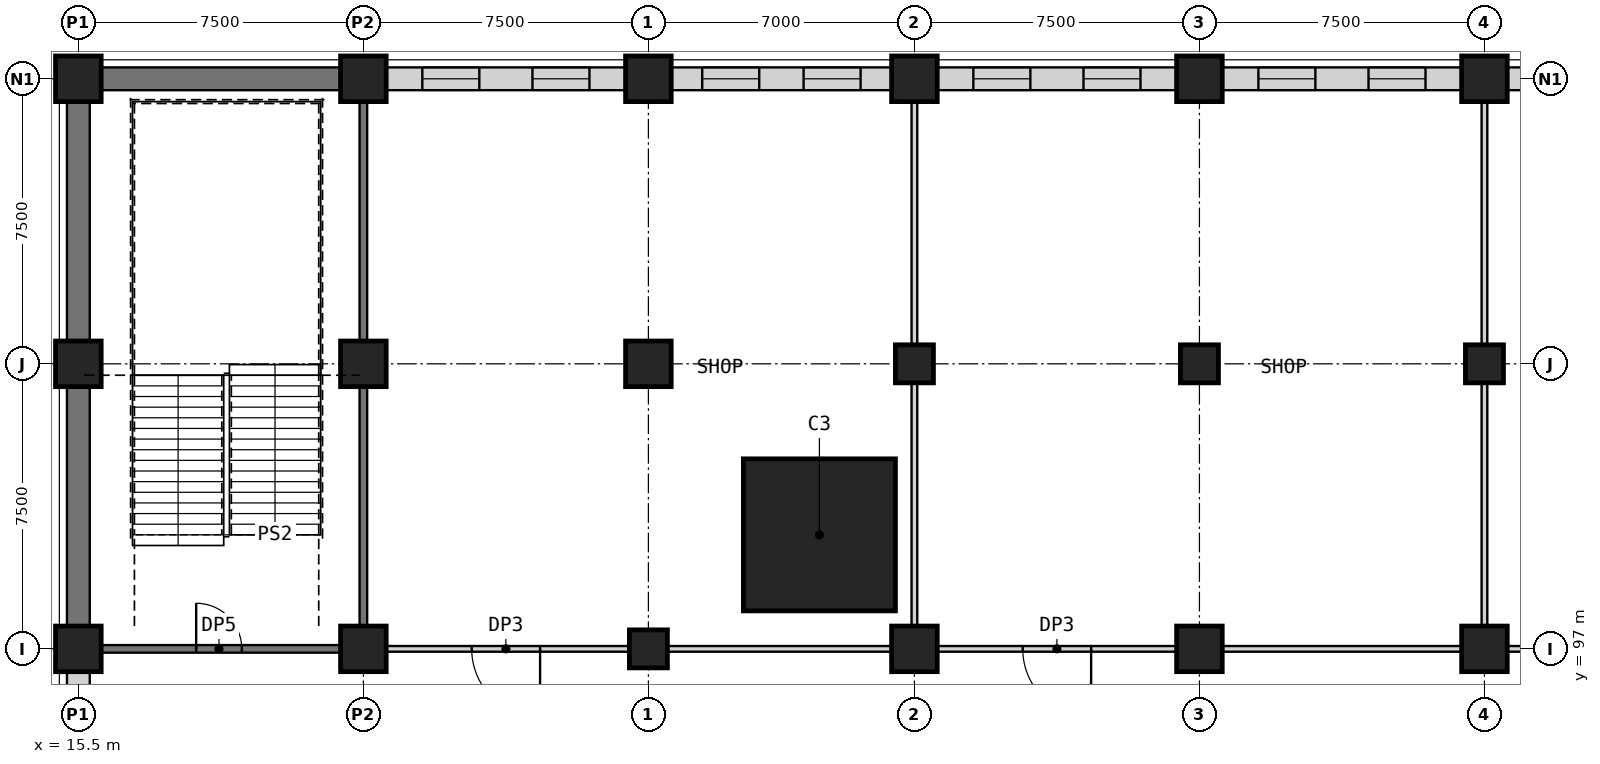
"""IFC4 building model, lengths in metres.
Left out: names, types, materials, properties, quantities, classifications, styles, units other than length and angle.
Written with IfcOpenShell. Run it as: python <this file> out.ifc"""

import sys

from ifc_helpers import new_model, si_unit, direction, frame, frame_2d, origin, origin_2d, place, context, subcontext, project, spatial, rectangle, extrude, element, fill, save


model = new_model("IFC4")
c1 = context("Model", 3, precision=1e-05, world=origin(), true_north=direction((0.0, 1.0)))
c2 = subcontext(c1, "Body", "Model", "MODEL_VIEW")
j1 = project(units=[si_unit("LENGTHUNIT", "METRE"), si_unit("PLANEANGLEUNIT", "RADIAN")], contexts=[c1])
p1 = place(None, origin())
s1 = spatial("IfcSite", under=j1, at=p1, CompositionType="ELEMENT")
p2 = place(p1, origin())
s2 = spatial("IfcBuilding", under=s1, at=p2, CompositionType="ELEMENT")
p3 = place(p2, frame((0.0, 0.0, 8.0)))
s3 = spatial("IfcBuildingStorey", under=s2, at=p3, CompositionType="ELEMENT", Elevation=8.0)
p4 = place(p3, frame((30.5, 97.0, 0.0), z_axis=(0.0, 0.0, 1.0), x_axis=(1.0, 0.0, 0.0)))
e1 = element("IfcColumn", 1, at=p4, inside=s3, PredefinedType="COLUMN", context=c2, shape_type="SweptSolid", body=[
    extrude(rectangle(XDim=1.0, YDim=1.0, at=origin_2d()), origin(), (0.0, 0.0, 1.0), 5.5),
])
p5 = place(p3, frame((37.5, 97.0, 0.0), z_axis=(0.0, 0.0, 1.0), x_axis=(1.0, 0.0, 0.0)))
e2 = element("IfcColumn", 2, at=p5, inside=s3, PredefinedType="COLUMN", context=c2, shape_type="SweptSolid", body=[
    extrude(rectangle(XDim=1.2, YDim=1.2, at=origin_2d()), origin(), (0.0, 0.0, 1.0), 5.5),
])
p6 = place(p3, frame((37.5, 104.5, 0.0), z_axis=(0.0, 0.0, 1.0), x_axis=(1.0, 0.0, 0.0)))
e3 = element("IfcColumn", 3, at=p6, inside=s3, PredefinedType="COLUMN", context=c2, shape_type="SweptSolid", body=[
    extrude(rectangle(XDim=1.0, YDim=1.0, at=origin_2d()), origin(), (0.0, 0.0, 1.0), 5.5),
])
p7 = place(p3, frame((45.0, 97.0, 0.0), z_axis=(0.0, 0.0, 1.0), x_axis=(1.0, 0.0, 0.0)))
e4 = element("IfcColumn", 4, at=p7, inside=s3, PredefinedType="COLUMN", context=c2, shape_type="SweptSolid", body=[
    extrude(rectangle(XDim=1.2, YDim=1.2, at=origin_2d()), origin(), (0.0, 0.0, 1.0), 5.5),
])
p8 = place(p3, frame((45.0, 104.5, 0.0), z_axis=(0.0, 0.0, 1.0), x_axis=(1.0, 0.0, 0.0)))
e5 = element("IfcColumn", 5, at=p8, inside=s3, PredefinedType="COLUMN", context=c2, shape_type="SweptSolid", body=[
    extrude(rectangle(XDim=1.0, YDim=1.0, at=origin_2d()), origin(), (0.0, 0.0, 1.0), 5.5),
])
p9 = place(p3, frame((52.5, 97.0, 0.0), z_axis=(0.0, 0.0, 1.0), x_axis=(1.0, 0.0, 0.0)))
e6 = element("IfcColumn", 6, at=p9, inside=s3, PredefinedType="COLUMN", context=c2, shape_type="SweptSolid", body=[
    extrude(rectangle(XDim=1.2, YDim=1.2, at=origin_2d()), origin(), (0.0, 0.0, 1.0), 5.5),
])
p10 = place(p3, frame((52.5, 104.5, 0.0), z_axis=(0.0, 0.0, 1.0), x_axis=(1.0, 0.0, 0.0)))
e7 = element("IfcColumn", 7, at=p10, inside=s3, PredefinedType="COLUMN", context=c2, shape_type="SweptSolid", body=[
    extrude(rectangle(XDim=1.0, YDim=1.0, at=origin_2d()), origin(), (0.0, 0.0, 1.0), 5.5),
])
p11 = place(p3, frame((35.0, 100.0, 0.0), z_axis=(0.0, 0.0, 1.0), x_axis=(1.0, 0.0, 0.0)))
e8 = element("IfcColumn", 8, at=p11, inside=s3, PredefinedType="COLUMN", context=c2, shape_type="SweptSolid", body=[
    extrude(rectangle(XDim=4.0, YDim=4.0, at=origin_2d()), origin(), (0.0, 0.0, 1.0), 5.5),
])
for number, where, z_axis, x_axis in (
    (9, (15.5, 97.0, 0.0), (0.0, 0.0, 1.0), (1.0, 0.0, 0.0)),
    (10, (15.5, 104.5, 0.0), (0.0, 0.0, 1.0), (1.0, 0.0, 0.0)),
    (11, (15.5, 112.0, 0.0), (0.0, 0.0, 1.0), (1.0, 0.0, 0.0)),
    (12, (23.0, 97.0, 0.0), (0.0, 0.0, 1.0), (1.0, 0.0, 0.0)),
    (13, (23.0, 104.5, 0.0), (0.0, 0.0, 1.0), (1.0, 0.0, 0.0)),
    (14, (23.0, 112.0, 0.0), (0.0, 0.0, 1.0), (1.0, 0.0, 0.0)),
    (15, (30.5, 104.5, 0.0), (0.0, 0.0, 1.0), (1.0, 0.0, 0.0)),
    (16, (30.5, 112.0, 0.0), (0.0, 0.0, 1.0), (1.0, 0.0, 0.0)),
    (17, (37.5, 112.0, 0.0), (0.0, 0.0, 1.0), (1.0, 0.0, 0.0)),
    (18, (45.0, 112.0, 0.0), (0.0, 0.0, 1.0), (1.0, 0.0, 0.0)),
    (19, (52.5, 112.0, 0.0), (0.0, 0.0, 1.0), (1.0, 0.0, 0.0)),
):
    element("IfcColumn", number, at=place(p3, frame(where, z_axis=z_axis, x_axis=x_axis)), inside=s3, PredefinedType="COLUMN", context=c2, shape_type="SweptSolid", body=[
        extrude(rectangle(XDim=1.2, YDim=1.2, at=origin_2d()), origin(), (0.0, 0.0, 1.0), 5.5),
    ])
p12 = place(p3, frame((16.1, 97.0, 0.0), z_axis=(0.0, 0.0, 1.0), x_axis=(1.0, 0.0, 0.0)))
e20 = element("IfcWall", 20, at=p12, inside=s3, PredefinedType="SHEAR", context=c2, shape_type="SweptSolid", body=[
    extrude(rectangle(XDim=6.3, YDim=0.2, at=frame_2d((3.15, 0.0))), origin(), (0.0, 0.0, 1.0), 5.2),
])
p13 = place(p12, frame((2.5, 0.0, 0.0)))
e21 = element("IfcOpeningElement", 21, at=p13, cuts=e20, PredefinedType="OPENING", context=c2, shape_type="SweptSolid", body=[
    extrude(rectangle(XDim=1.2, YDim=2.1, at=frame_2d((0.6, 1.05))), frame((0.0, 0.11, 0.0), z_axis=(0.0, -1.0, 0.0), x_axis=(1.0, 0.0, 0.0)), (0.0, 0.0, 1.0), 0.22),
])
p14 = place(p3, frame((30.0, 97.0, 0.0), z_axis=(0.0, 0.0, 1.0), x_axis=(-1.0, 0.0, 0.0)))
e22 = element("IfcWall", 22, at=p14, inside=s3, PredefinedType="PARTITIONING", context=c2, shape_type="SweptSolid", body=[
    extrude(rectangle(XDim=6.4, YDim=0.15, at=frame_2d((3.2, 0.0))), origin(), (0.0, 0.0, 1.0), 5.2),
])
p15 = place(p14, frame((2.35, 0.0, 0.0)))
e23 = element("IfcOpeningElement", 23, at=p15, cuts=e22, PredefinedType="OPENING", context=c2, shape_type="SweptSolid", body=[
    extrude(rectangle(XDim=1.8, YDim=2.4, at=frame_2d((0.9, 1.2))), frame((0.0, 0.085, 0.0), z_axis=(0.0, -1.0, 0.0), x_axis=(1.0, 0.0, 0.0)), (0.0, 0.0, 1.0), 0.17),
])
p16 = place(p3, frame((31.0, 97.0, 0.0), z_axis=(0.0, 0.0, 1.0), x_axis=(1.0, 0.0, 0.0)))
e24 = element("IfcWall", 24, at=p16, inside=s3, PredefinedType="PARTITIONING", context=c2, shape_type="SweptSolid", body=[
    extrude(rectangle(XDim=5.9, YDim=0.15, at=frame_2d((2.95, 0.0))), origin(), (0.0, 0.0, 1.0), 5.2),
])
p17 = place(p3, frame((44.4, 97.0, 0.0), z_axis=(0.0, 0.0, 1.0), x_axis=(-1.0, 0.0, 0.0)))
e25 = element("IfcWall", 25, at=p17, inside=s3, PredefinedType="PARTITIONING", context=c2, shape_type="SweptSolid", body=[
    extrude(rectangle(XDim=6.3, YDim=0.15, at=frame_2d((3.15, 0.0))), origin(), (0.0, 0.0, 1.0), 5.2),
])
p18 = place(p17, frame((2.25, 0.0, 0.0)))
e26 = element("IfcOpeningElement", 26, at=p18, cuts=e25, PredefinedType="OPENING", context=c2, shape_type="SweptSolid", body=[
    extrude(rectangle(XDim=1.8, YDim=2.4, at=frame_2d((0.9, 1.2))), frame((0.0, 0.085, 0.0), z_axis=(0.0, -1.0, 0.0), x_axis=(1.0, 0.0, 0.0)), (0.0, 0.0, 1.0), 0.17),
])
p19 = place(p3, frame((45.6, 97.0, 0.0), z_axis=(0.0, 0.0, 1.0), x_axis=(1.0, 0.0, 0.0)))
e27 = element("IfcWall", 27, at=p19, inside=s3, PredefinedType="PARTITIONING", context=c2, shape_type="SweptSolid", body=[
    extrude(rectangle(XDim=6.3, YDim=0.15, at=frame_2d((3.15, 0.0))), origin(), (0.0, 0.0, 1.0), 5.2),
])
p20 = place(p3, frame((59.4, 97.0, 0.0), z_axis=(0.0, 0.0, 1.0), x_axis=(-1.0, 0.0, 0.0)))
e28 = element("IfcWall", 28, at=p20, inside=s3, PredefinedType="PARTITIONING", context=c2, shape_type="SweptSolid", body=[
    extrude(rectangle(XDim=6.3, YDim=0.15, at=frame_2d((3.15, 0.0))), origin(), (0.0, 0.0, 1.0), 5.2),
])
p21 = place(p20, frame((2.25, 0.0, 0.0)))
e29 = element("IfcOpeningElement", 29, at=p21, cuts=e28, PredefinedType="OPENING", context=c2, shape_type="SweptSolid", body=[
    extrude(rectangle(XDim=1.8, YDim=2.4, at=frame_2d((0.9, 1.2))), frame((0.0, 0.085, 0.0), z_axis=(0.0, -1.0, 0.0), x_axis=(1.0, 0.0, 0.0)), (0.0, 0.0, 1.0), 0.17),
])
p22 = place(p3, frame((16.1, 112.0, 0.0), z_axis=(0.0, 0.0, 1.0), x_axis=(1.0, 0.0, 0.0)))
e30 = element("IfcWall", 30, at=p22, inside=s3, PredefinedType="PARTITIONING", context=c2, shape_type="SweptSolid", body=[
    extrude(rectangle(XDim=6.3, YDim=0.6, at=frame_2d((3.15, 0.0))), origin(), (0.0, 0.0, 1.0), 4.6),
])
p23 = place(p3, frame((23.6, 112.0, 0.0), z_axis=(0.0, 0.0, 1.0), x_axis=(1.0, 0.0, 0.0)))
e31 = element("IfcWall", 31, at=p23, inside=s3, PredefinedType="PARTITIONING", context=c2, shape_type="SweptSolid", body=[
    extrude(rectangle(XDim=6.3, YDim=0.6, at=frame_2d((3.15, 0.0))), origin(), (0.0, 0.0, 1.0), 4.6),
])
p24 = place(p23, frame((0.951, 0.0, 0.9)))
e32 = element("IfcOpeningElement", 32, at=p24, cuts=e31, PredefinedType="OPENING", context=c2, shape_type="SweptSolid", body=[
    extrude(rectangle(XDim=1.5, YDim=2.8, at=frame_2d((0.75, 1.4))), frame((0.0, 0.31, 0.0), z_axis=(0.0, -1.0, 0.0), x_axis=(1.0, 0.0, 0.0)), (0.0, 0.0, 1.0), 0.62),
])
p25 = place(p23, frame((3.849, 0.0, 0.9)))
e33 = element("IfcOpeningElement", 33, at=p25, cuts=e31, PredefinedType="OPENING", context=c2, shape_type="SweptSolid", body=[
    extrude(rectangle(XDim=1.5, YDim=2.8, at=frame_2d((0.75, 1.4))), frame((0.0, 0.31, 0.0), z_axis=(0.0, -1.0, 0.0), x_axis=(1.0, 0.0, 0.0)), (0.0, 0.0, 1.0), 0.62),
])
p26 = place(p3, frame((31.1, 112.0, 0.0), z_axis=(0.0, 0.0, 1.0), x_axis=(1.0, 0.0, 0.0)))
e34 = element("IfcWall", 34, at=p26, inside=s3, PredefinedType="PARTITIONING", context=c2, shape_type="SweptSolid", body=[
    extrude(rectangle(XDim=5.8, YDim=0.6, at=frame_2d((2.9, 0.0))), origin(), (0.0, 0.0, 1.0), 4.6),
])
p27 = place(p26, frame((0.816, 0.0, 0.9)))
e35 = element("IfcOpeningElement", 35, at=p27, cuts=e34, PredefinedType="OPENING", context=c2, shape_type="SweptSolid", body=[
    extrude(rectangle(XDim=1.5, YDim=2.8, at=frame_2d((0.75, 1.4))), frame((0.0, 0.31, 0.0), z_axis=(0.0, -1.0, 0.0), x_axis=(1.0, 0.0, 0.0)), (0.0, 0.0, 1.0), 0.62),
])
p28 = place(p26, frame((3.484, 0.0, 0.9)))
e36 = element("IfcOpeningElement", 36, at=p28, cuts=e34, PredefinedType="OPENING", context=c2, shape_type="SweptSolid", body=[
    extrude(rectangle(XDim=1.5, YDim=2.8, at=frame_2d((0.75, 1.4))), frame((0.0, 0.31, 0.0), z_axis=(0.0, -1.0, 0.0), x_axis=(1.0, 0.0, 0.0)), (0.0, 0.0, 1.0), 0.62),
])
p29 = place(p3, frame((38.1, 112.0, 0.0), z_axis=(0.0, 0.0, 1.0), x_axis=(1.0, 0.0, 0.0)))
e37 = element("IfcWall", 37, at=p29, inside=s3, PredefinedType="PARTITIONING", context=c2, shape_type="SweptSolid", body=[
    extrude(rectangle(XDim=6.3, YDim=0.6, at=frame_2d((3.15, 0.0))), origin(), (0.0, 0.0, 1.0), 4.6),
])
p30 = place(p29, frame((0.951, 0.0, 0.9)))
e38 = element("IfcOpeningElement", 38, at=p30, cuts=e37, PredefinedType="OPENING", context=c2, shape_type="SweptSolid", body=[
    extrude(rectangle(XDim=1.5, YDim=2.8, at=frame_2d((0.75, 1.4))), frame((0.0, 0.31, 0.0), z_axis=(0.0, -1.0, 0.0), x_axis=(1.0, 0.0, 0.0)), (0.0, 0.0, 1.0), 0.62),
])
p31 = place(p29, frame((3.849, 0.0, 0.9)))
e39 = element("IfcOpeningElement", 39, at=p31, cuts=e37, PredefinedType="OPENING", context=c2, shape_type="SweptSolid", body=[
    extrude(rectangle(XDim=1.5, YDim=2.8, at=frame_2d((0.75, 1.4))), frame((0.0, 0.31, 0.0), z_axis=(0.0, -1.0, 0.0), x_axis=(1.0, 0.0, 0.0)), (0.0, 0.0, 1.0), 0.62),
])
p32 = place(p3, frame((45.6, 112.0, 0.0), z_axis=(0.0, 0.0, 1.0), x_axis=(1.0, 0.0, 0.0)))
e40 = element("IfcWall", 40, at=p32, inside=s3, PredefinedType="PARTITIONING", context=c2, shape_type="SweptSolid", body=[
    extrude(rectangle(XDim=6.3, YDim=0.6, at=frame_2d((3.15, 0.0))), origin(), (0.0, 0.0, 1.0), 4.6),
])
p33 = place(p32, frame((0.951, 0.0, 0.9)))
e41 = element("IfcOpeningElement", 41, at=p33, cuts=e40, PredefinedType="OPENING", context=c2, shape_type="SweptSolid", body=[
    extrude(rectangle(XDim=1.5, YDim=2.8, at=frame_2d((0.75, 1.4))), frame((0.0, 0.31, 0.0), z_axis=(0.0, -1.0, 0.0), x_axis=(1.0, 0.0, 0.0)), (0.0, 0.0, 1.0), 0.62),
])
p34 = place(p32, frame((3.849, 0.0, 0.9)))
e42 = element("IfcOpeningElement", 42, at=p34, cuts=e40, PredefinedType="OPENING", context=c2, shape_type="SweptSolid", body=[
    extrude(rectangle(XDim=1.5, YDim=2.8, at=frame_2d((0.75, 1.4))), frame((0.0, 0.31, 0.0), z_axis=(0.0, -1.0, 0.0), x_axis=(1.0, 0.0, 0.0)), (0.0, 0.0, 1.0), 0.62),
])
p35 = place(p3, frame((53.1, 112.0, 0.0), z_axis=(0.0, 0.0, 1.0), x_axis=(1.0, 0.0, 0.0)))
e43 = element("IfcWall", 43, at=p35, inside=s3, PredefinedType="PARTITIONING", context=c2, shape_type="SweptSolid", body=[
    extrude(rectangle(XDim=6.3, YDim=0.6, at=frame_2d((3.15, 0.0))), origin(), (0.0, 0.0, 1.0), 4.6),
])
p36 = place(p35, frame((0.951, 0.0, 0.9)))
e44 = element("IfcOpeningElement", 44, at=p36, cuts=e43, PredefinedType="OPENING", context=c2, shape_type="SweptSolid", body=[
    extrude(rectangle(XDim=1.5, YDim=2.8, at=frame_2d((0.75, 1.4))), frame((0.0, 0.31, 0.0), z_axis=(0.0, -1.0, 0.0), x_axis=(1.0, 0.0, 0.0)), (0.0, 0.0, 1.0), 0.62),
])
p37 = place(p35, frame((3.849, 0.0, 0.9)))
e45 = element("IfcOpeningElement", 45, at=p37, cuts=e43, PredefinedType="OPENING", context=c2, shape_type="SweptSolid", body=[
    extrude(rectangle(XDim=1.5, YDim=2.8, at=frame_2d((0.75, 1.4))), frame((0.0, 0.31, 0.0), z_axis=(0.0, -1.0, 0.0), x_axis=(1.0, 0.0, 0.0)), (0.0, 0.0, 1.0), 0.62),
])
p38 = place(p3, frame((15.5, 90.6, 0.0), z_axis=(0.0, 0.0, 1.0), x_axis=(0.0, 1.0, 0.0)))
e46 = element("IfcWall", 46, at=p38, inside=s3, PredefinedType="PARTITIONING", context=c2, shape_type="SweptSolid", body=[
    extrude(rectangle(XDim=5.8, YDim=0.6, at=frame_2d((2.9, 0.0))), origin(), (0.0, 0.0, 1.0), 4.6),
])
p39 = place(p38, frame((0.816, 0.0, 0.9)))
e47 = element("IfcOpeningElement", 47, at=p39, cuts=e46, PredefinedType="OPENING", context=c2, shape_type="SweptSolid", body=[
    extrude(rectangle(XDim=1.5, YDim=2.8, at=frame_2d((0.75, 1.4))), frame((0.0, 0.31, 0.0), z_axis=(0.0, -1.0, 0.0), x_axis=(1.0, 0.0, 0.0)), (0.0, 0.0, 1.0), 0.62),
])
p40 = place(p38, frame((3.484, 0.0, 0.9)))
e48 = element("IfcOpeningElement", 48, at=p40, cuts=e46, PredefinedType="OPENING", context=c2, shape_type="SweptSolid", body=[
    extrude(rectangle(XDim=1.5, YDim=2.8, at=frame_2d((0.75, 1.4))), frame((0.0, 0.31, 0.0), z_axis=(0.0, -1.0, 0.0), x_axis=(1.0, 0.0, 0.0)), (0.0, 0.0, 1.0), 0.62),
])
for number, where, z_axis, x_axis in (
    (49, (15.5, 97.6, 0.0), (0.0, 0.0, 1.0), (0.0, 1.0, 0.0)),
    (50, (15.5, 105.1, 0.0), (0.0, 0.0, 1.0), (0.0, 1.0, 0.0)),
):
    element("IfcWall", number, at=place(p3, frame(where, z_axis=z_axis, x_axis=x_axis)), inside=s3, PredefinedType="PARTITIONING", context=c2, shape_type="SweptSolid", body=[
        extrude(rectangle(XDim=6.3, YDim=0.6, at=frame_2d((3.15, 0.0))), origin(), (0.0, 0.0, 1.0), 4.6),
    ])
for number, where, z_axis, x_axis in (
    (51, (23.0, 97.6, 0.0), (0.0, 0.0, 1.0), (0.0, 1.0, 0.0)),
    (52, (23.0, 105.1, 0.0), (0.0, 0.0, 1.0), (0.0, 1.0, 0.0)),
):
    element("IfcWall", number, at=place(p3, frame(where, z_axis=z_axis, x_axis=x_axis)), inside=s3, PredefinedType="SHEAR", context=c2, shape_type="SweptSolid", body=[
        extrude(rectangle(XDim=6.3, YDim=0.2, at=frame_2d((3.15, 0.0))), origin(), (0.0, 0.0, 1.0), 5.2),
    ])
for number, where, z_axis, x_axis in (
    (53, (52.5, 97.6, 0.0), (0.0, 0.0, 1.0), (0.0, 1.0, 0.0)),
    (54, (52.5, 105.0, 0.0), (0.0, 0.0, 1.0), (0.0, 1.0, 0.0)),
    (55, (37.5, 97.6, 0.0), (0.0, 0.0, 1.0), (0.0, 1.0, 0.0)),
    (56, (37.5, 105.0, 0.0), (0.0, 0.0, 1.0), (0.0, 1.0, 0.0)),
):
    element("IfcWall", number, at=place(p3, frame(where, z_axis=z_axis, x_axis=x_axis)), inside=s3, PredefinedType="PARTITIONING", context=c2, shape_type="SweptSolid", body=[
        extrude(rectangle(XDim=6.4, YDim=0.15, at=frame_2d((3.2, 0.0))), origin(), (0.0, 0.0, 1.0), 5.2),
    ])
p41 = place(p13, origin())
e57 = element("IfcDoor", 57, at=p41, inside=s3, OperationType="SINGLE_SWING_LEFT", PredefinedType="DOOR", context=c2, shape_type="SweptSolid", body=[
    extrude(rectangle(XDim=1.2, YDim=2.1, at=frame_2d((0.6, 1.05))), frame((0.0, 0.025, 0.0), z_axis=(0.0, -1.0, 0.0), x_axis=(1.0, 0.0, 0.0)), (0.0, 0.0, 1.0), 0.05),
])
fill(e21, e57)
p42 = place(p15, origin())
e58 = element("IfcDoor", 58, at=p42, inside=s3, OperationType="SINGLE_SWING_LEFT", PredefinedType="DOOR", context=c2, shape_type="SweptSolid", body=[
    extrude(rectangle(XDim=1.8, YDim=2.4, at=frame_2d((0.9, 1.2))), frame((0.0, 0.025, 0.0), z_axis=(0.0, -1.0, 0.0), x_axis=(1.0, 0.0, 0.0)), (0.0, 0.0, 1.0), 0.05),
])
fill(e23, e58)
p43 = place(p18, origin())
e59 = element("IfcDoor", 59, at=p43, inside=s3, OperationType="SINGLE_SWING_LEFT", PredefinedType="DOOR", context=c2, shape_type="SweptSolid", body=[
    extrude(rectangle(XDim=1.8, YDim=2.4, at=frame_2d((0.9, 1.2))), frame((0.0, 0.025, 0.0), z_axis=(0.0, -1.0, 0.0), x_axis=(1.0, 0.0, 0.0)), (0.0, 0.0, 1.0), 0.05),
])
fill(e26, e59)
p44 = place(p24, origin())
e60 = element("IfcWindow", 60, at=p44, inside=s3, PartitioningType="SINGLE_PANEL", PredefinedType="WINDOW", context=c2, shape_type="SweptSolid", body=[
    extrude(rectangle(XDim=1.5, YDim=2.8, at=frame_2d((0.75, 1.4))), frame((0.0, 0.03, 0.0), z_axis=(0.0, -1.0, 0.0), x_axis=(1.0, 0.0, 0.0)), (0.0, 0.0, 1.0), 0.06),
])
fill(e32, e60)
p45 = place(p25, origin())
e61 = element("IfcWindow", 61, at=p45, inside=s3, PartitioningType="SINGLE_PANEL", PredefinedType="WINDOW", context=c2, shape_type="SweptSolid", body=[
    extrude(rectangle(XDim=1.5, YDim=2.8, at=frame_2d((0.75, 1.4))), frame((0.0, 0.03, 0.0), z_axis=(0.0, -1.0, 0.0), x_axis=(1.0, 0.0, 0.0)), (0.0, 0.0, 1.0), 0.06),
])
fill(e33, e61)
p46 = place(p27, origin())
e62 = element("IfcWindow", 62, at=p46, inside=s3, PartitioningType="SINGLE_PANEL", PredefinedType="WINDOW", context=c2, shape_type="SweptSolid", body=[
    extrude(rectangle(XDim=1.5, YDim=2.8, at=frame_2d((0.75, 1.4))), frame((0.0, 0.03, 0.0), z_axis=(0.0, -1.0, 0.0), x_axis=(1.0, 0.0, 0.0)), (0.0, 0.0, 1.0), 0.06),
])
fill(e35, e62)
p47 = place(p28, origin())
e63 = element("IfcWindow", 63, at=p47, inside=s3, PartitioningType="SINGLE_PANEL", PredefinedType="WINDOW", context=c2, shape_type="SweptSolid", body=[
    extrude(rectangle(XDim=1.5, YDim=2.8, at=frame_2d((0.75, 1.4))), frame((0.0, 0.03, 0.0), z_axis=(0.0, -1.0, 0.0), x_axis=(1.0, 0.0, 0.0)), (0.0, 0.0, 1.0), 0.06),
])
fill(e36, e63)
p48 = place(p30, origin())
e64 = element("IfcWindow", 64, at=p48, inside=s3, PartitioningType="SINGLE_PANEL", PredefinedType="WINDOW", context=c2, shape_type="SweptSolid", body=[
    extrude(rectangle(XDim=1.5, YDim=2.8, at=frame_2d((0.75, 1.4))), frame((0.0, 0.03, 0.0), z_axis=(0.0, -1.0, 0.0), x_axis=(1.0, 0.0, 0.0)), (0.0, 0.0, 1.0), 0.06),
])
fill(e38, e64)
p49 = place(p31, origin())
e65 = element("IfcWindow", 65, at=p49, inside=s3, PartitioningType="SINGLE_PANEL", PredefinedType="WINDOW", context=c2, shape_type="SweptSolid", body=[
    extrude(rectangle(XDim=1.5, YDim=2.8, at=frame_2d((0.75, 1.4))), frame((0.0, 0.03, 0.0), z_axis=(0.0, -1.0, 0.0), x_axis=(1.0, 0.0, 0.0)), (0.0, 0.0, 1.0), 0.06),
])
fill(e39, e65)
p50 = place(p33, origin())
e66 = element("IfcWindow", 66, at=p50, inside=s3, PartitioningType="SINGLE_PANEL", PredefinedType="WINDOW", context=c2, shape_type="SweptSolid", body=[
    extrude(rectangle(XDim=1.5, YDim=2.8, at=frame_2d((0.75, 1.4))), frame((0.0, 0.03, 0.0), z_axis=(0.0, -1.0, 0.0), x_axis=(1.0, 0.0, 0.0)), (0.0, 0.0, 1.0), 0.06),
])
fill(e41, e66)
p51 = place(p34, origin())
e67 = element("IfcWindow", 67, at=p51, inside=s3, PartitioningType="SINGLE_PANEL", PredefinedType="WINDOW", context=c2, shape_type="SweptSolid", body=[
    extrude(rectangle(XDim=1.5, YDim=2.8, at=frame_2d((0.75, 1.4))), frame((0.0, 0.03, 0.0), z_axis=(0.0, -1.0, 0.0), x_axis=(1.0, 0.0, 0.0)), (0.0, 0.0, 1.0), 0.06),
])
fill(e42, e67)
save(model, sys.argv[1])
